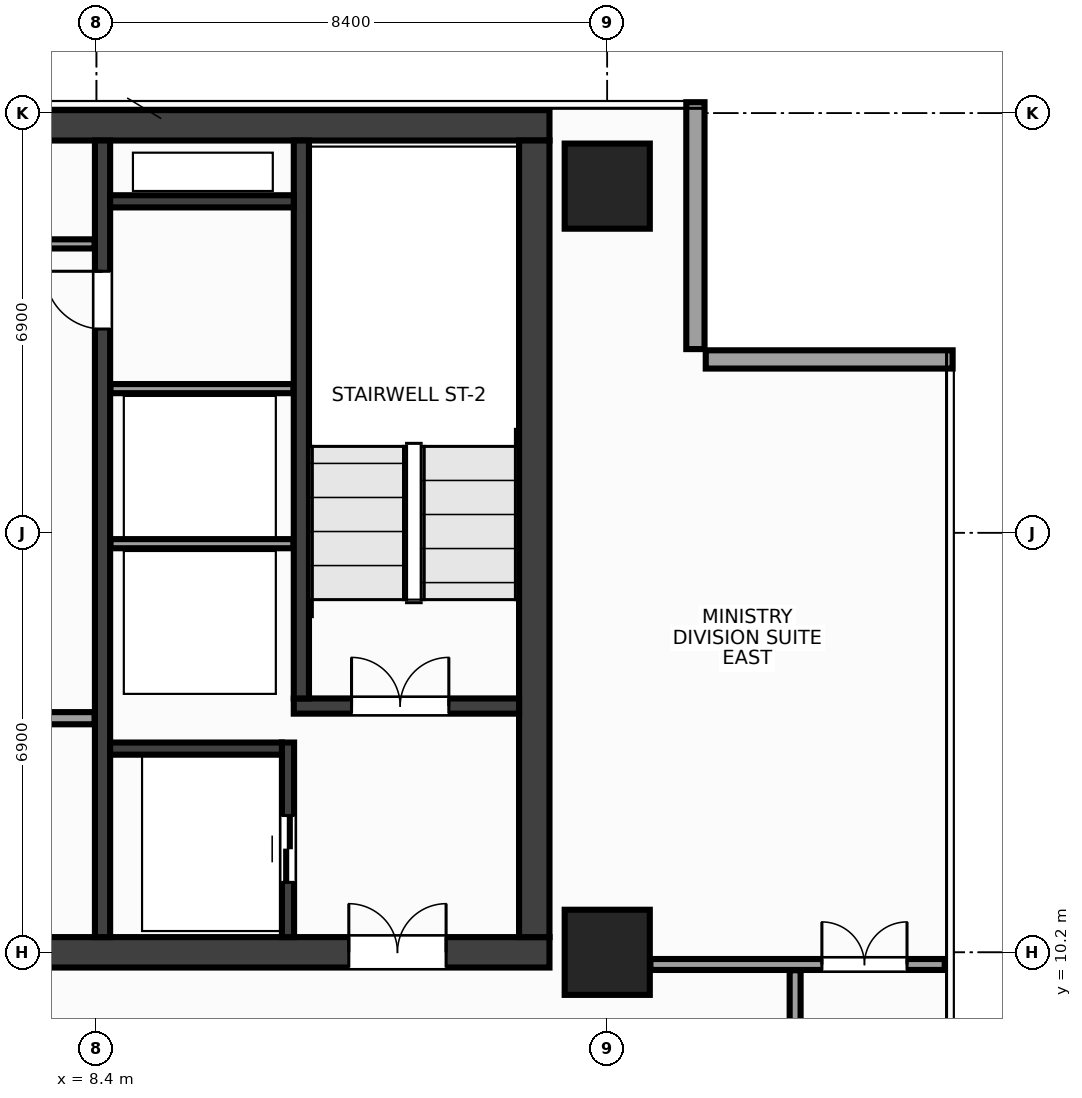
"""IFC4 building model, lengths in metres.
Left out: names, types, materials, properties, quantities, classifications, styles, units other than length and angle.
Written with IfcOpenShell. Run it as: python <this file> out.ifc"""

import sys

from ifc_helpers import new_model, si_unit, direction, frame, frame_2d, origin, origin_2d, place, context, subcontext, project, spatial, rectangle, extrude, source, transform, mapped, element, fill, save


model = new_model("IFC4")
c1 = context("Model", 3, precision=1e-05, world=origin(), true_north=direction((0.0, 1.0)))
c2 = subcontext(c1, "Body", "Model", "MODEL_VIEW")
j1 = project(units=[si_unit("LENGTHUNIT", "METRE"), si_unit("PLANEANGLEUNIT", "RADIAN")], contexts=[c1])
p1 = place(None, origin())
s1 = spatial("IfcSite", under=j1, at=p1, CompositionType="ELEMENT")
p2 = place(p1, origin())
s2 = spatial("IfcBuilding", under=s1, at=p2, CompositionType="ELEMENT")
p3 = place(p2, frame((0.0, 0.0, 264.8)))
s3 = spatial("IfcBuildingStorey", under=s2, at=p3, CompositionType="ELEMENT", Elevation=264.8)
m1 = source(origin(), c2, "Body", "SweptSolid", [
    extrude(rectangle(XDim=31.7, YDim=0.5, at=frame_2d((15.85, 0.0))), origin(), (0.0, 0.0, 1.0), 3.6),
])
p4 = place(p3, frame((-15.85, 23.8, 0.0), z_axis=(0.0, 0.0, 1.0), x_axis=(1.0, 0.0, 0.0)))
e1 = element("IfcWall", 1, at=p4, inside=s3, PredefinedType="SHEAR", context=c2, shape_type="MappedRepresentation", body=[
    mapped(m1, transform((0.0, 0.0, 0.0), x_axis=(1.0, 0.0, 0.0), y_axis=(0.0, 1.0, 0.0), z_axis=(0.0, 0.0, 1.0), scale=1.0)),
])
p5 = place(p3, frame((-15.85, 10.2, 0.0), z_axis=(0.0, 0.0, 1.0), x_axis=(1.0, 0.0, 0.0)))
e2 = element("IfcWall", 2, at=p5, inside=s3, PredefinedType="SHEAR", context=c2, shape_type="MappedRepresentation", body=[
    mapped(m1, transform((0.0, 0.0, 0.0), x_axis=(1.0, 0.0, 0.0), y_axis=(0.0, 1.0, 0.0), z_axis=(0.0, 0.0, 1.0), scale=1.0)),
])
p6 = place(p5, frame((1.7, 0.0, 0.0)))
e3 = element("IfcOpeningElement", 3, at=p6, cuts=e2, PredefinedType="OPENING", context=c2, shape_type="SweptSolid", body=[
    extrude(rectangle(XDim=1.6, YDim=2.15, at=frame_2d((0.8, 1.075))), frame((0.0, 0.262, 0.0), z_axis=(0.0, -1.0, 0.0), x_axis=(1.0, 0.0, 0.0)), (0.0, 0.0, 1.0), 0.524),
])
p7 = place(p5, frame((28.4, 0.0, 0.0)))
e4 = element("IfcOpeningElement", 4, at=p7, cuts=e2, PredefinedType="OPENING", context=c2, shape_type="SweptSolid", body=[
    extrude(rectangle(XDim=1.6, YDim=2.15, at=frame_2d((0.8, 1.075))), frame((0.0, 0.262, 0.0), z_axis=(0.0, -1.0, 0.0), x_axis=(1.0, 0.0, 0.0)), (0.0, 0.0, 1.0), 0.524),
])
p8 = place(p5, frame((15.1, 0.0, 0.0)))
e5 = element("IfcOpeningElement", 5, at=p8, cuts=e2, PredefinedType="OPENING", context=c2, shape_type="SweptSolid", body=[
    extrude(rectangle(XDim=1.5, YDim=2.2, at=frame_2d((0.75, 1.1))), frame((0.0, 0.262, 0.0), z_axis=(0.0, -1.0, 0.0), x_axis=(1.0, 0.0, 0.0)), (0.0, 0.0, 1.0), 0.524),
])
m2 = source(origin(), c2, "Body", "SweptSolid", [
    extrude(rectangle(XDim=13.1, YDim=0.5, at=frame_2d((6.55, 0.0))), origin(), (0.0, 0.0, 1.0), 3.6),
])
p9 = place(p3, frame((15.6, 10.45, 0.0), z_axis=(0.0, 0.0, 1.0), x_axis=(0.0, 1.0, 0.0)))
e6 = element("IfcWall", 6, at=p9, inside=s3, PredefinedType="SHEAR", context=c2, shape_type="MappedRepresentation", body=[
    mapped(m2, transform((0.0, 0.0, 0.0), x_axis=(1.0, 0.0, 0.0), y_axis=(0.0, 1.0, 0.0), z_axis=(0.0, 0.0, 1.0), scale=1.0)),
])
m3 = source(origin(), c2, "Body", "SweptSolid", [
    extrude(rectangle(XDim=13.1, YDim=0.25, at=frame_2d((6.55, 0.0))), origin(), (0.0, 0.0, 1.0), 3.6),
])
p10 = place(p3, frame((8.5, 10.45, 0.0), z_axis=(0.0, 0.0, 1.0), x_axis=(0.0, 1.0, 0.0)))
e7 = element("IfcWall", 7, at=p10, inside=s3, PredefinedType="SHEAR", context=c2, shape_type="MappedRepresentation", body=[
    mapped(m3, transform((0.0, 0.0, 0.0), x_axis=(1.0, 0.0, 0.0), y_axis=(0.0, 1.0, 0.0), z_axis=(0.0, 0.0, 1.0), scale=1.0)),
])
p11 = place(p10, frame((10.0, 0.0, 0.0)))
e8 = element("IfcOpeningElement", 8, at=p11, cuts=e7, PredefinedType="OPENING", context=c2, shape_type="SweptSolid", body=[
    extrude(rectangle(XDim=0.95, YDim=2.15, at=frame_2d((0.475, 1.075))), frame((0.0, 0.137, 0.0), z_axis=(0.0, -1.0, 0.0), x_axis=(1.0, 0.0, 0.0)), (0.0, 0.0, 1.0), 0.274),
])
m4 = source(origin(), c2, "Body", "SweptSolid", [
    extrude(rectangle(XDim=3.705, YDim=0.25, at=frame_2d((1.853, 0.0))), origin(), (0.0, 0.0, 1.0), 3.6),
])
p12 = place(p3, frame((11.645, 14.25, 0.0), z_axis=(0.0, 0.0, 1.0), x_axis=(1.0, 0.0, 0.0)))
e9 = element("IfcWall", 9, at=p12, inside=s3, PredefinedType="SHEAR", context=c2, shape_type="MappedRepresentation", body=[
    mapped(m4, transform((0.0, 0.0, 0.0), x_axis=(1.0, 0.0, 0.0), y_axis=(0.0, 1.0, 0.0), z_axis=(0.0, 0.0, 1.0), scale=1.0)),
])
p13 = place(p12, frame((0.95, 0.0, 0.0)))
e10 = element("IfcOpeningElement", 10, at=p13, cuts=e9, PredefinedType="OPENING", context=c2, shape_type="SweptSolid", body=[
    extrude(rectangle(XDim=1.6, YDim=2.15, at=frame_2d((0.8, 1.075))), frame((0.0, 0.137, 0.0), z_axis=(0.0, -1.0, 0.0), x_axis=(1.0, 0.0, 0.0)), (0.0, 0.0, 1.0), 0.274),
])
m5 = source(origin(), c2, "Body", "SweptSolid", [
    extrude(rectangle(XDim=9.175, YDim=0.25, at=frame_2d((4.587, 0.0))), origin(), (0.0, 0.0, 1.0), 3.6),
])
p14 = place(p3, frame((11.77, 14.375, 0.0), z_axis=(0.0, 0.0, 1.0), x_axis=(0.0, 1.0, 0.0)))
e11 = element("IfcWall", 11, at=p14, inside=s3, PredefinedType="SHEAR", context=c2, shape_type="MappedRepresentation", body=[
    mapped(m5, transform((0.0, 0.0, 0.0), x_axis=(1.0, 0.0, 0.0), y_axis=(0.0, 1.0, 0.0), z_axis=(0.0, 0.0, 1.0), scale=1.0)),
])
m6 = source(origin(), c2, "Body", "SweptSolid", [
    extrude(rectangle(XDim=3.2, YDim=0.2, at=frame_2d((1.6, 0.0))), origin(), (0.0, 0.0, 1.0), 3.6),
])
p15 = place(p3, frame((11.55, 10.45, 0.0), z_axis=(0.0, 0.0, 1.0), x_axis=(0.0, 1.0, 0.0)))
e12 = element("IfcWall", 12, at=p15, inside=s3, PredefinedType="SHEAR", context=c2, shape_type="MappedRepresentation", body=[
    mapped(m6, transform((0.0, 0.0, 0.0), x_axis=(1.0, 0.0, 0.0), y_axis=(0.0, 1.0, 0.0), z_axis=(0.0, 0.0, 1.0), scale=1.0)),
])
p16 = place(p15, frame((0.9, 0.0, 0.0)))
e13 = element("IfcOpeningElement", 13, at=p16, cuts=e12, PredefinedType="OPENING", context=c2, shape_type="SweptSolid", body=[
    extrude(rectangle(XDim=1.1, YDim=2.15, at=frame_2d((0.55, 1.075))), frame((0.0, 0.112, 0.0), z_axis=(0.0, -1.0, 0.0), x_axis=(1.0, 0.0, 0.0)), (0.0, 0.0, 1.0), 0.224),
])
m7 = source(origin(), c2, "Body", "SweptSolid", [
    extrude(rectangle(XDim=2.825, YDim=0.2, at=frame_2d((1.413, 0.0))), origin(), (0.0, 0.0, 1.0), 3.6),
])
p17 = place(p3, frame((8.625, 13.55, 0.0), z_axis=(0.0, 0.0, 1.0), x_axis=(1.0, 0.0, 0.0)))
e14 = element("IfcWall", 14, at=p17, inside=s3, PredefinedType="SHEAR", context=c2, shape_type="MappedRepresentation", body=[
    mapped(m7, transform((0.0, 0.0, 0.0), x_axis=(1.0, 0.0, 0.0), y_axis=(0.0, 1.0, 0.0), z_axis=(0.0, 0.0, 1.0), scale=1.0)),
])
m8 = source(origin(), c2, "Body", "SweptSolid", [
    extrude(rectangle(XDim=3.02, YDim=0.2, at=frame_2d((1.51, 0.0))), origin(), (0.0, 0.0, 1.0), 3.6),
])
p18 = place(p3, frame((8.625, 22.55, 0.0), z_axis=(0.0, 0.0, 1.0), x_axis=(1.0, 0.0, 0.0)))
e15 = element("IfcWall", 15, at=p18, inside=s3, PredefinedType="SHEAR", context=c2, shape_type="MappedRepresentation", body=[
    mapped(m8, transform((0.0, 0.0, 0.0), x_axis=(1.0, 0.0, 0.0), y_axis=(0.0, 1.0, 0.0), z_axis=(0.0, 0.0, 1.0), scale=1.0)),
])
m9 = source(origin(), c2, "Body", "SweptSolid", [
    extrude(rectangle(XDim=1.4, YDim=1.4, at=origin_2d()), origin(), (0.0, 0.0, 1.0), 3.6),
])
for number, where, z_axis, x_axis in (
    (16, (16.8, 10.2, 0.0), (0.0, 0.0, 1.0), (1.0, 0.0, 0.0)),
    (17, (16.8, 22.8, 0.0), (0.0, 0.0, 1.0), (1.0, 0.0, 0.0)),
):
    element("IfcColumn", number, at=place(p3, frame(where, z_axis=z_axis, x_axis=x_axis)), inside=s3, PredefinedType="COLUMN", context=c2, shape_type="MappedRepresentation", body=[
        mapped(m9, transform((0.0, 0.0, 0.0), x_axis=(1.0, 0.0, 0.0), y_axis=(0.0, 1.0, 0.0), z_axis=(0.0, 0.0, 1.0), scale=1.0)),
    ])
m10 = source(origin(), c2, "Body", "SweptSolid", [
    extrude(rectangle(XDim=4.06, YDim=0.3, at=frame_2d((2.03, 0.0))), origin(), (0.0, 0.0, 1.0), 2.75),
])
p19 = place(p3, frame((22.48, 19.95, 0.0), z_axis=(0.0, 0.0, 1.0), x_axis=(-1.0, 0.0, 0.0)))
e18 = element("IfcWall", 18, at=p19, inside=s3, PredefinedType="STANDARD", context=c2, shape_type="MappedRepresentation", body=[
    mapped(m10, transform((0.0, 0.0, 0.0), x_axis=(1.0, 0.0, 0.0), y_axis=(0.0, 1.0, 0.0), z_axis=(0.0, 0.0, 1.0), scale=1.0)),
])
m11 = source(origin(), c2, "Body", "SweptSolid", [
    extrude(rectangle(XDim=4.06, YDim=0.3, at=frame_2d((2.03, 0.0))), origin(), (0.0, 0.0, 1.0), 2.75),
])
p20 = place(p3, frame((18.25, 20.12, 0.0), z_axis=(0.0, 0.0, 1.0), x_axis=(0.0, 1.0, 0.0)))
e19 = element("IfcWall", 19, at=p20, inside=s3, PredefinedType="STANDARD", context=c2, shape_type="MappedRepresentation", body=[
    mapped(m11, transform((0.0, 0.0, 0.0), x_axis=(1.0, 0.0, 0.0), y_axis=(0.0, 1.0, 0.0), z_axis=(0.0, 0.0, 1.0), scale=1.0)),
])
m12 = source(origin(), c2, "Body", "SweptSolid", [
    extrude(rectangle(XDim=3.01, YDim=0.15, at=frame_2d((1.505, 0.0))), origin(), (0.0, 0.0, 1.0), 3.37),
])
for number, where, z_axis, x_axis in (
    (20, (8.63, 16.92, 0.0), (0.0, 0.0, 1.0), (1.0, 0.0, 0.0)),
    (21, (8.63, 19.47, 0.0), (0.0, 0.0, 1.0), (1.0, 0.0, 0.0)),
):
    element("IfcWall", number, at=place(p3, frame(where, z_axis=z_axis, x_axis=x_axis)), inside=s3, PredefinedType="PARTITIONING", context=c2, shape_type="MappedRepresentation", body=[
        mapped(m12, transform((0.0, 0.0, 0.0), x_axis=(1.0, 0.0, 0.0), y_axis=(0.0, 1.0, 0.0), z_axis=(0.0, 0.0, 1.0), scale=1.0)),
    ])
m13 = source(origin(), c2, "Body", "SweptSolid", [
    extrude(rectangle(XDim=7.07, YDim=0.2, at=frame_2d((3.535, 0.0))), origin(), (0.0, 0.0, 1.0), 3.37),
])
p21 = place(p3, frame((1.3, 14.05, 0.0), z_axis=(0.0, 0.0, 1.0), x_axis=(1.0, 0.0, 0.0)))
e22 = element("IfcWall", 22, at=p21, inside=s3, PredefinedType="PARTITIONING", context=c2, shape_type="MappedRepresentation", body=[
    mapped(m13, transform((0.0, 0.0, 0.0), x_axis=(1.0, 0.0, 0.0), y_axis=(0.0, 1.0, 0.0), z_axis=(0.0, 0.0, 1.0), scale=1.0)),
])
p22 = place(p21, frame((2.8, 0.0, 0.0)))
e23 = element("IfcOpeningElement", 23, at=p22, cuts=e22, PredefinedType="OPENING", context=c2, shape_type="SweptSolid", body=[
    extrude(rectangle(XDim=0.98, YDim=2.15, at=frame_2d((0.49, 1.075))), frame((0.0, 0.112, 0.0), z_axis=(0.0, -1.0, 0.0), x_axis=(1.0, 0.0, 0.0)), (0.0, 0.0, 1.0), 0.224),
])
m14 = source(origin(), c2, "Body", "SweptSolid", [
    extrude(rectangle(XDim=2.07, YDim=0.15, at=frame_2d((1.035, 0.0))), origin(), (0.0, 0.0, 1.0), 3.37),
])
p23 = place(p3, frame((6.3, 21.85, 0.0), z_axis=(0.0, 0.0, 1.0), x_axis=(1.0, 0.0, 0.0)))
e24 = element("IfcWall", 24, at=p23, inside=s3, PredefinedType="PARTITIONING", context=c2, shape_type="MappedRepresentation", body=[
    mapped(m14, transform((0.0, 0.0, 0.0), x_axis=(1.0, 0.0, 0.0), y_axis=(0.0, 1.0, 0.0), z_axis=(0.0, 0.0, 1.0), scale=1.0)),
])
m15 = source(origin(), c2, "Body", "SweptSolid", [
    extrude(rectangle(XDim=4.84, YDim=0.18, at=frame_2d((2.42, 0.0))), origin(), (0.0, 0.0, 1.0), 3.37),
])
p24 = place(p3, frame((17.51, 10.0, 0.0), z_axis=(0.0, 0.0, 1.0), x_axis=(1.0, 0.0, 0.0)))
e25 = element("IfcWall", 25, at=p24, inside=s3, PredefinedType="PARTITIONING", context=c2, shape_type="MappedRepresentation", body=[
    mapped(m15, transform((0.0, 0.0, 0.0), x_axis=(1.0, 0.0, 0.0), y_axis=(0.0, 1.0, 0.0), z_axis=(0.0, 0.0, 1.0), scale=1.0)),
])
p25 = place(p24, frame((2.82, 0.0, 0.0)))
e26 = element("IfcOpeningElement", 26, at=p25, cuts=e25, PredefinedType="OPENING", context=c2, shape_type="SweptSolid", body=[
    extrude(rectangle(XDim=1.4, YDim=2.2, at=frame_2d((0.7, 1.1))), frame((0.0, 0.102, 0.0), z_axis=(0.0, -1.0, 0.0), x_axis=(1.0, 0.0, 0.0)), (0.0, 0.0, 1.0), 0.204),
])
m16 = source(origin(), c2, "Body", "SweptSolid", [
    extrude(rectangle(XDim=2.1, YDim=0.18, at=frame_2d((1.05, 0.0))), origin(), (0.0, 0.0, 1.0), 3.37),
])
p26 = place(p3, frame((19.89, 7.805, 0.0), z_axis=(0.0, 0.0, 1.0), x_axis=(0.0, 1.0, 0.0)))
e27 = element("IfcWall", 27, at=p26, inside=s3, PredefinedType="PARTITIONING", context=c2, shape_type="MappedRepresentation", body=[
    mapped(m16, transform((0.0, 0.0, 0.0), x_axis=(1.0, 0.0, 0.0), y_axis=(0.0, 1.0, 0.0), z_axis=(0.0, 0.0, 1.0), scale=1.0)),
])
m17 = source(origin(), c2, "Body", "SweptSolid", [
    extrude(rectangle(XDim=1.6, YDim=2.15, at=frame_2d((0.8, 1.075))), frame((0.0, 0.025, 0.0), z_axis=(0.0, -1.0, 0.0), x_axis=(1.0, 0.0, 0.0)), (0.0, 0.0, 1.0), 0.05),
])
p27 = place(p13, origin())
e28 = element("IfcDoor", 28, at=p27, inside=s3, OperationType="DOUBLE_DOOR_SINGLE_SWING", PredefinedType="DOOR", context=c2, shape_type="MappedRepresentation", body=[
    mapped(m17, transform((0.0, 0.0, 0.0), x_axis=(1.0, 0.0, 0.0), y_axis=(0.0, 1.0, 0.0), z_axis=(0.0, 0.0, 1.0), scale=1.0)),
])
fill(e10, e28)
p28 = place(p7, origin())
e29 = element("IfcDoor", 29, at=p28, inside=s3, OperationType="DOUBLE_DOOR_SINGLE_SWING", PredefinedType="DOOR", context=c2, shape_type="MappedRepresentation", body=[
    mapped(m17, transform((0.0, 0.0, 0.0), x_axis=(1.0, 0.0, 0.0), y_axis=(0.0, 1.0, 0.0), z_axis=(0.0, 0.0, 1.0), scale=1.0)),
])
fill(e4, e29)
m18 = source(origin(), c2, "Body", "SweptSolid", [
    extrude(rectangle(XDim=1.1, YDim=2.15, at=frame_2d((0.55, 1.075))), frame((0.0, 0.025, 0.0), z_axis=(0.0, -1.0, 0.0), x_axis=(1.0, 0.0, 0.0)), (0.0, 0.0, 1.0), 0.05),
])
p29 = place(p16, origin())
e30 = element("IfcDoor", 30, at=p29, inside=s3, OperationType="DOUBLE_DOOR_SLIDING", PredefinedType="DOOR", context=c2, shape_type="MappedRepresentation", body=[
    mapped(m18, transform((0.0, 0.0, 0.0), x_axis=(1.0, 0.0, 0.0), y_axis=(0.0, 1.0, 0.0), z_axis=(0.0, 0.0, 1.0), scale=1.0)),
])
fill(e13, e30)
m19 = source(origin(), c2, "Body", "SweptSolid", [
    extrude(rectangle(XDim=0.95, YDim=2.15, at=frame_2d((0.475, 1.075))), frame((0.0, 0.025, 0.0), z_axis=(0.0, -1.0, 0.0), x_axis=(1.0, 0.0, 0.0)), (0.0, 0.0, 1.0), 0.05),
])
p30 = place(p11, origin())
e31 = element("IfcDoor", 31, at=p30, inside=s3, OperationType="SINGLE_SWING_RIGHT", PredefinedType="DOOR", context=c2, shape_type="MappedRepresentation", body=[
    mapped(m19, transform((0.0, 0.0, 0.0), x_axis=(1.0, 0.0, 0.0), y_axis=(0.0, 1.0, 0.0), z_axis=(0.0, 0.0, 1.0), scale=1.0)),
])
fill(e8, e31)
m20 = source(origin(), c2, "Body", "SweptSolid", [
    extrude(rectangle(XDim=1.4, YDim=2.2, at=frame_2d((0.7, 1.1))), frame((0.0, 0.025, 0.0), z_axis=(0.0, -1.0, 0.0), x_axis=(1.0, 0.0, 0.0)), (0.0, 0.0, 1.0), 0.05),
])
p31 = place(p25, origin())
e32 = element("IfcDoor", 32, at=p31, inside=s3, OperationType="DOUBLE_DOOR_SINGLE_SWING", PredefinedType="DOOR", context=c2, shape_type="MappedRepresentation", body=[
    mapped(m20, transform((0.0, 0.0, 0.0), x_axis=(1.0, 0.0, 0.0), y_axis=(0.0, 1.0, 0.0), z_axis=(0.0, 0.0, 1.0), scale=1.0)),
])
fill(e26, e32)
save(model, sys.argv[1])
